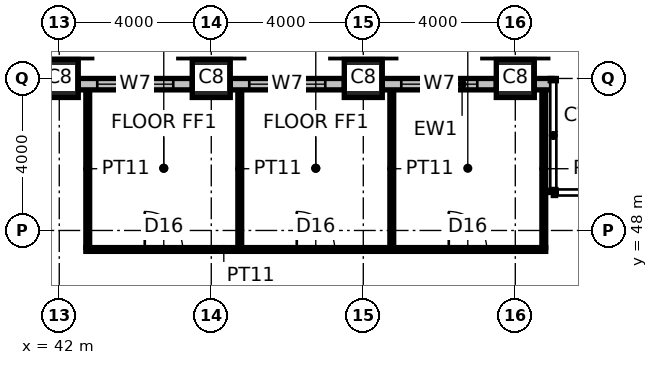
"""IFC4 building model, lengths in metres.
Left out: names, types, materials, properties, quantities, classifications, styles, units other than length and angle.
Written with IfcOpenShell. Run it as: python <this file> out.ifc"""

import sys

from ifc_helpers import new_model, si_unit, direction, frame, frame_2d, origin, origin_2d, place, context, subcontext, project, spatial, rectangle, hollow_rectangle, extrude, element, fill, save


model = new_model("IFC4")
c1 = context("Model", 3, precision=1e-05, world=origin(), true_north=direction((0.0, 1.0)))
c2 = subcontext(c1, "Body", "Model", "MODEL_VIEW")
j1 = project(units=[si_unit("LENGTHUNIT", "METRE"), si_unit("PLANEANGLEUNIT", "RADIAN")], contexts=[c1])
p1 = place(None, origin())
s1 = spatial("IfcSite", under=j1, at=p1, CompositionType="ELEMENT")
p2 = place(p1, origin())
s2 = spatial("IfcBuilding", under=s1, at=p2, CompositionType="ELEMENT")
p3 = place(p2, frame((0.0, 0.0, 133.4)))
s3 = spatial("IfcBuildingStorey", under=s2, at=p3, CompositionType="ELEMENT", Elevation=133.4)
for number, where, z_axis, x_axis in (
    (1, (42.0, 52.0, 0.0), (0.0, 0.0, 1.0), (1.0, 0.0, 0.0)),
    (2, (46.0, 52.0, 0.0), (0.0, 0.0, 1.0), (1.0, 0.0, 0.0)),
    (3, (50.0, 52.0, 0.0), (0.0, 0.0, 1.0), (1.0, 0.0, 0.0)),
    (4, (54.0, 52.0, 0.0), (0.0, 0.0, 1.0), (1.0, 0.0, 0.0)),
):
    element("IfcColumn", number, at=place(p3, frame(where, z_axis=z_axis, x_axis=x_axis)), inside=s3, PredefinedType="COLUMN", context=c2, shape_type="SweptSolid", body=[
        extrude(hollow_rectangle(XDim=1.0, YDim=1.0, WallThickness=0.125, at=origin_2d()), origin(), (0.0, 0.0, 1.0), 4.0),
    ])
p4 = place(p3, frame((42.7, 47.5, 0.0), z_axis=(0.0, 0.0, 1.0), x_axis=(1.0, 0.0, 0.0)))
e5 = element("IfcWall", 5, at=p4, inside=s3, PredefinedType="PARTITIONING", context=c2, shape_type="SweptSolid", body=[
    extrude(rectangle(XDim=12.1, YDim=0.1, at=frame_2d((6.05, 0.0))), origin(), (0.0, 0.0, 1.0), 3.85),
])
p5 = place(p4, frame((1.55, 0.0, 0.0)))
e6 = element("IfcOpeningElement", 6, at=p5, cuts=e5, PredefinedType="OPENING", context=c2, shape_type="SweptSolid", body=[
    extrude(rectangle(XDim=1.0, YDim=2.2, at=frame_2d((0.5, 1.1))), frame((0.0, 0.06, 0.0), z_axis=(0.0, -1.0, 0.0), x_axis=(1.0, 0.0, 0.0)), (0.0, 0.0, 1.0), 0.12),
])
p6 = place(p4, frame((5.55, 0.0, 0.0)))
e7 = element("IfcOpeningElement", 7, at=p6, cuts=e5, PredefinedType="OPENING", context=c2, shape_type="SweptSolid", body=[
    extrude(rectangle(XDim=1.0, YDim=2.2, at=frame_2d((0.5, 1.1))), frame((0.0, 0.06, 0.0), z_axis=(0.0, -1.0, 0.0), x_axis=(1.0, 0.0, 0.0)), (0.0, 0.0, 1.0), 0.12),
])
p7 = place(p4, frame((9.55, 0.0, 0.0)))
e8 = element("IfcOpeningElement", 8, at=p7, cuts=e5, PredefinedType="OPENING", context=c2, shape_type="SweptSolid", body=[
    extrude(rectangle(XDim=1.0, YDim=2.2, at=frame_2d((0.5, 1.1))), frame((0.0, 0.06, 0.0), z_axis=(0.0, -1.0, 0.0), x_axis=(1.0, 0.0, 0.0)), (0.0, 0.0, 1.0), 0.12),
])
for number, where, z_axis, x_axis in (
    (9, (42.75, 47.55, 0.0), (0.0, 0.0, 1.0), (0.0, 1.0, 0.0)),
    (10, (46.75, 47.55, 0.0), (0.0, 0.0, 1.0), (0.0, 1.0, 0.0)),
    (11, (50.75, 47.55, 0.0), (0.0, 0.0, 1.0), (0.0, 1.0, 0.0)),
    (12, (54.75, 47.55, 0.0), (0.0, 0.0, 1.0), (0.0, 1.0, 0.0)),
):
    element("IfcWall", number, at=place(p3, frame(where, z_axis=z_axis, x_axis=x_axis)), inside=s3, PredefinedType="PARTITIONING", context=c2, shape_type="SweptSolid", body=[
        extrude(rectangle(XDim=4.15, YDim=0.1, at=frame_2d((2.075, 0.0))), origin(), (0.0, 0.0, 1.0), 3.85),
    ])
p8 = place(p3, frame((45.5, 51.85, 0.0), z_axis=(0.0, 0.0, 1.0), x_axis=(-1.0, 0.0, 0.0)))
e13 = element("IfcWall", 13, at=p8, inside=s3, PredefinedType="ELEMENTEDWALL", context=c2, shape_type="SweptSolid", body=[
    extrude(rectangle(XDim=3.0, YDim=0.3, at=frame_2d((1.5, 0.0))), origin(), (0.0, 0.0, 1.0), 2.95),
])
p9 = place(p8, frame((0.5, 0.0, 0.8)))
e14 = element("IfcOpeningElement", 14, at=p9, cuts=e13, PredefinedType="OPENING", context=c2, shape_type="SweptSolid", body=[
    extrude(rectangle(XDim=2.0, YDim=1.8, at=frame_2d((1.0, 0.9))), frame((0.0, 0.16, 0.0), z_axis=(0.0, -1.0, 0.0), x_axis=(1.0, 0.0, 0.0)), (0.0, 0.0, 1.0), 0.32),
])
p10 = place(p3, frame((49.5, 51.85, 0.0), z_axis=(0.0, 0.0, 1.0), x_axis=(-1.0, 0.0, 0.0)))
e15 = element("IfcWall", 15, at=p10, inside=s3, PredefinedType="ELEMENTEDWALL", context=c2, shape_type="SweptSolid", body=[
    extrude(rectangle(XDim=3.0, YDim=0.3, at=frame_2d((1.5, 0.0))), origin(), (0.0, 0.0, 1.0), 2.65),
])
p11 = place(p10, frame((0.5, 0.0, 0.8)))
e16 = element("IfcOpeningElement", 16, at=p11, cuts=e15, PredefinedType="OPENING", context=c2, shape_type="SweptSolid", body=[
    extrude(rectangle(XDim=2.0, YDim=1.8, at=frame_2d((1.0, 0.9))), frame((0.0, 0.16, 0.0), z_axis=(0.0, -1.0, 0.0), x_axis=(1.0, 0.0, 0.0)), (0.0, 0.0, 1.0), 0.32),
])
p12 = place(p3, frame((53.5, 51.85, 0.0), z_axis=(0.0, 0.0, 1.0), x_axis=(-1.0, 0.0, 0.0)))
e17 = element("IfcWall", 17, at=p12, inside=s3, PredefinedType="ELEMENTEDWALL", context=c2, shape_type="SweptSolid", body=[
    extrude(rectangle(XDim=3.0, YDim=0.3, at=frame_2d((1.5, 0.0))), origin(), (0.0, 0.0, 1.0), 2.65),
])
p13 = place(p12, frame((0.5, 0.0, 0.8)))
e18 = element("IfcOpeningElement", 18, at=p13, cuts=e17, PredefinedType="OPENING", context=c2, shape_type="SweptSolid", body=[
    extrude(rectangle(XDim=2.0, YDim=1.8, at=frame_2d((1.0, 0.9))), frame((0.0, 0.16, 0.0), z_axis=(0.0, -1.0, 0.0), x_axis=(1.0, 0.0, 0.0)), (0.0, 0.0, 1.0), 0.32),
])
p14 = place(p3, frame((54.97, 51.85, 0.0), z_axis=(0.0, 0.0, 1.0), x_axis=(-1.0, 0.0, 0.0)))
e19 = element("IfcWall", 19, at=p14, inside=s3, PredefinedType="ELEMENTEDWALL", context=c2, shape_type="SweptSolid", body=[
    extrude(rectangle(XDim=0.47, YDim=0.3, at=frame_2d((0.235, 0.0))), origin(), (0.0, 0.0, 1.0), 2.95),
])
p15 = place(p5, origin())
e20 = element("IfcDoor", 20, at=p15, inside=s3, OperationType="SINGLE_SWING_LEFT", PredefinedType="DOOR", context=c2, shape_type="SweptSolid", body=[
    extrude(rectangle(XDim=1.0, YDim=2.2, at=frame_2d((0.5, 1.1))), frame((0.0, 0.025, 0.0), z_axis=(0.0, -1.0, 0.0), x_axis=(1.0, 0.0, 0.0)), (0.0, 0.0, 1.0), 0.05),
])
fill(e6, e20)
p16 = place(p6, origin())
e21 = element("IfcDoor", 21, at=p16, inside=s3, OperationType="SINGLE_SWING_LEFT", PredefinedType="DOOR", context=c2, shape_type="SweptSolid", body=[
    extrude(rectangle(XDim=1.0, YDim=2.2, at=frame_2d((0.5, 1.1))), frame((0.0, 0.025, 0.0), z_axis=(0.0, -1.0, 0.0), x_axis=(1.0, 0.0, 0.0)), (0.0, 0.0, 1.0), 0.05),
])
fill(e7, e21)
p17 = place(p7, origin())
e22 = element("IfcDoor", 22, at=p17, inside=s3, OperationType="SINGLE_SWING_LEFT", PredefinedType="DOOR", context=c2, shape_type="SweptSolid", body=[
    extrude(rectangle(XDim=1.0, YDim=2.2, at=frame_2d((0.5, 1.1))), frame((0.0, 0.025, 0.0), z_axis=(0.0, -1.0, 0.0), x_axis=(1.0, 0.0, 0.0)), (0.0, 0.0, 1.0), 0.05),
])
fill(e8, e22)
p18 = place(p9, origin())
e23 = element("IfcWindow", 23, at=p18, inside=s3, PartitioningType="SINGLE_PANEL", PredefinedType="WINDOW", context=c2, shape_type="SweptSolid", body=[
    extrude(rectangle(XDim=2.0, YDim=1.8, at=frame_2d((1.0, 0.9))), frame((0.0, 0.03, 0.0), z_axis=(0.0, -1.0, 0.0), x_axis=(1.0, 0.0, 0.0)), (0.0, 0.0, 1.0), 0.06),
])
fill(e14, e23)
p19 = place(p11, origin())
e24 = element("IfcWindow", 24, at=p19, inside=s3, PartitioningType="SINGLE_PANEL", PredefinedType="WINDOW", context=c2, shape_type="SweptSolid", body=[
    extrude(rectangle(XDim=2.0, YDim=1.8, at=frame_2d((1.0, 0.9))), frame((0.0, 0.03, 0.0), z_axis=(0.0, -1.0, 0.0), x_axis=(1.0, 0.0, 0.0)), (0.0, 0.0, 1.0), 0.06),
])
fill(e16, e24)
p20 = place(p13, origin())
e25 = element("IfcWindow", 25, at=p20, inside=s3, PartitioningType="SINGLE_PANEL", PredefinedType="WINDOW", context=c2, shape_type="SweptSolid", body=[
    extrude(rectangle(XDim=2.0, YDim=1.8, at=frame_2d((1.0, 0.9))), frame((0.0, 0.03, 0.0), z_axis=(0.0, -1.0, 0.0), x_axis=(1.0, 0.0, 0.0)), (0.0, 0.0, 1.0), 0.06),
])
fill(e18, e25)
save(model, sys.argv[1])
